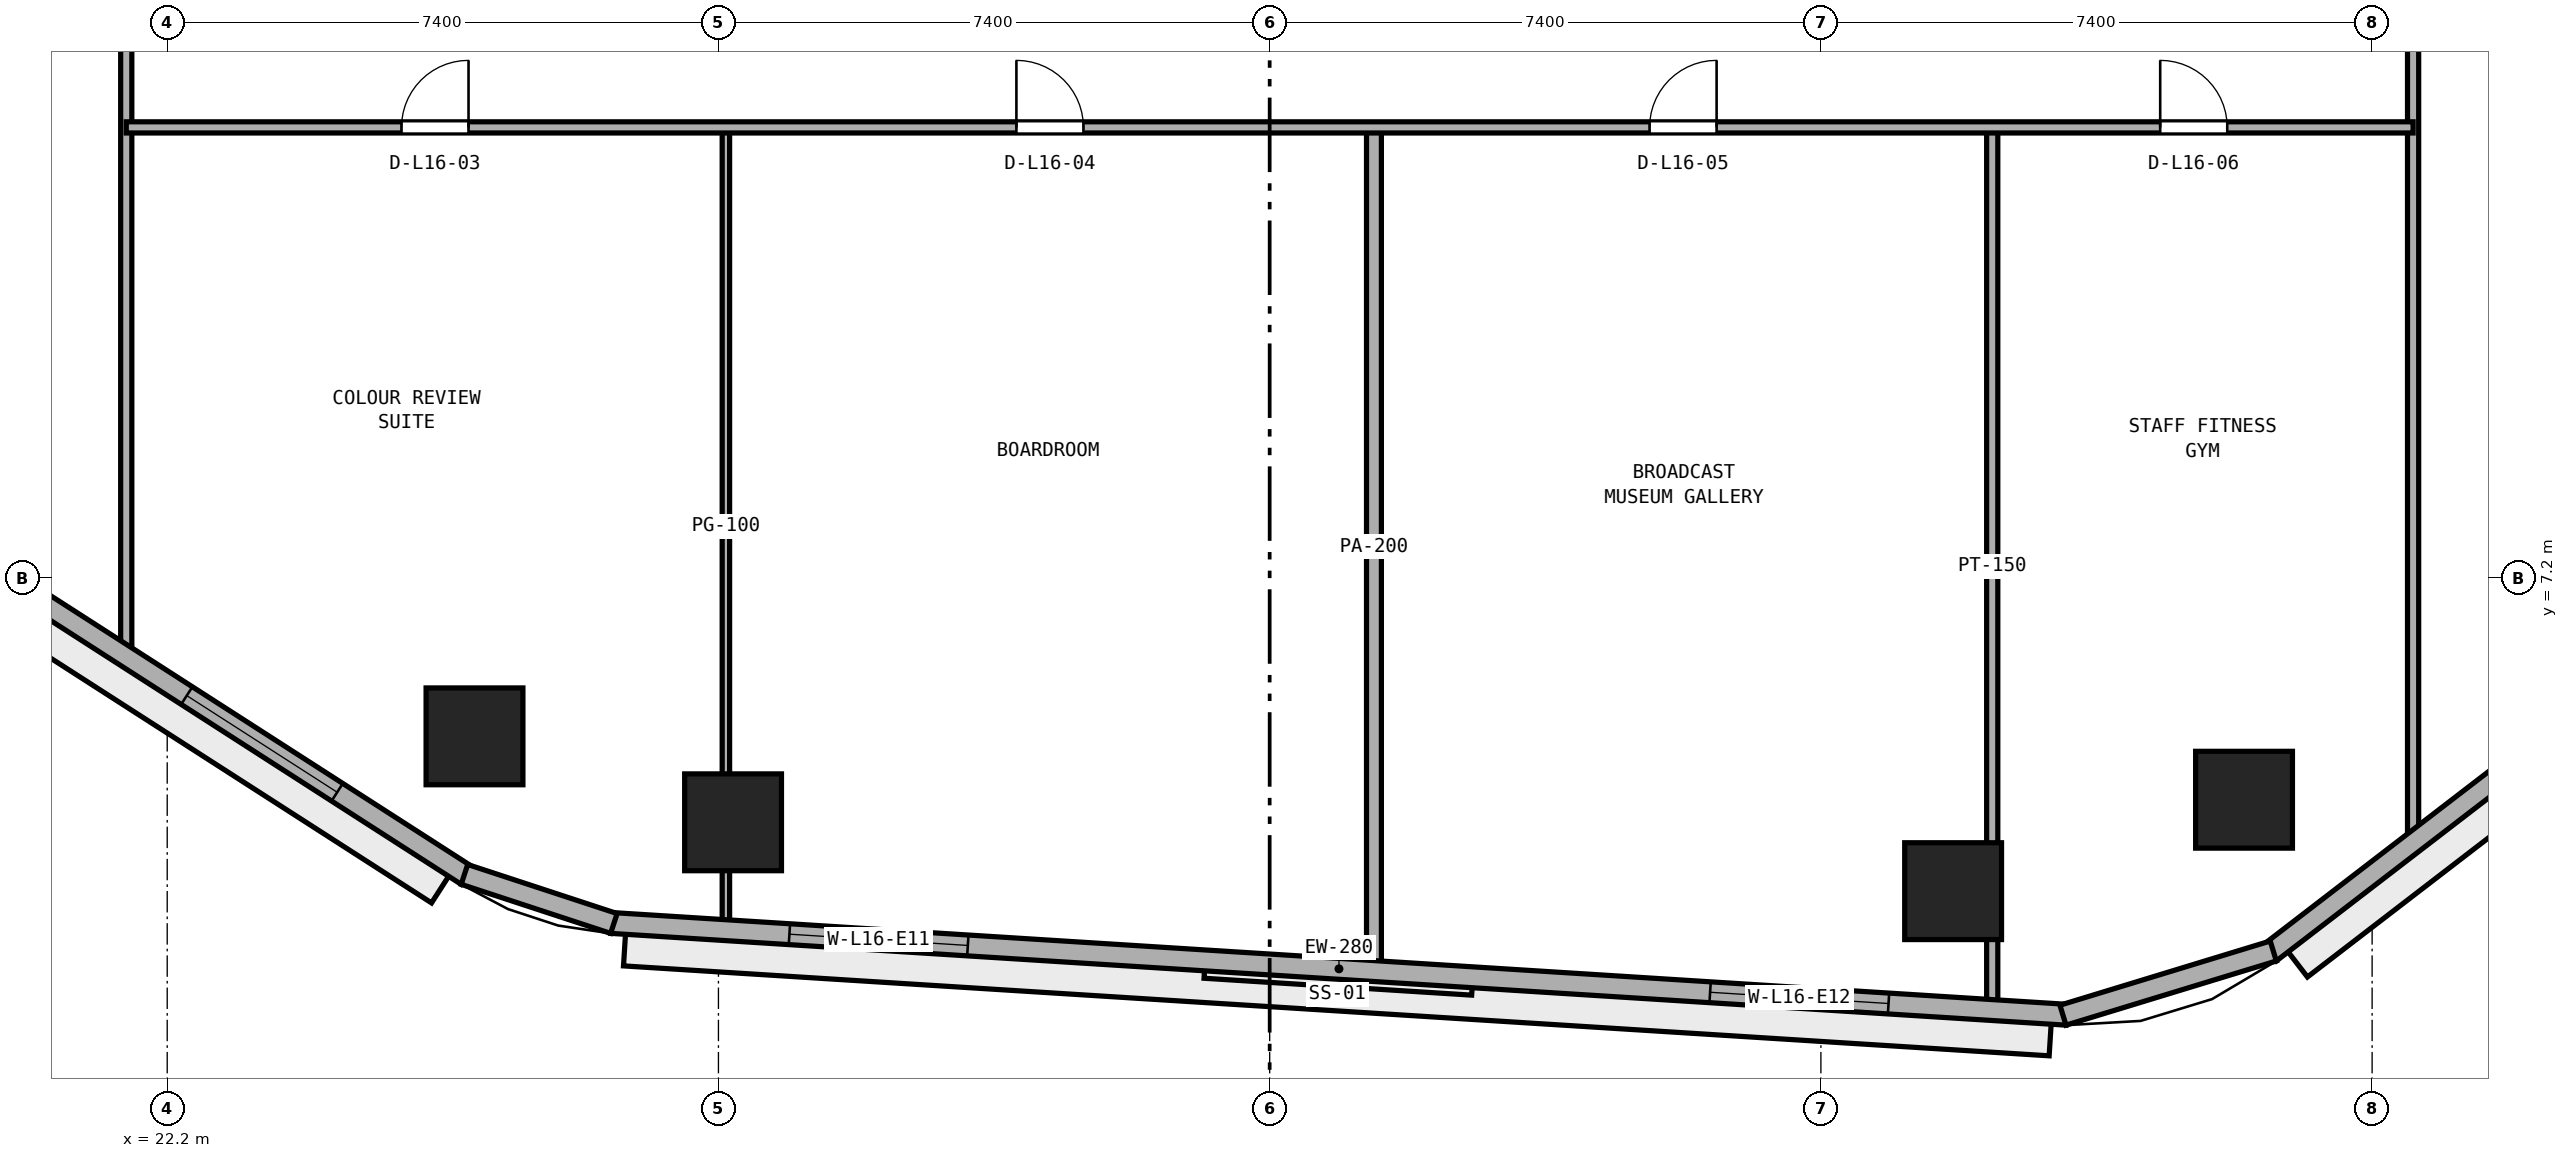
"""IFC4 building model, lengths in metres.
Left out: names, types, materials, properties, quantities, classifications, styles, units other than length and angle.
Written with IfcOpenShell. Run it as: python <this file> out.ifc"""

import sys

from ifc_helpers import new_model, si_unit, direction, frame, frame_2d, origin, origin_2d, place, context, subcontext, project, spatial, rectangle, extrude, element, fill, save


model = new_model("IFC4")
c1 = context("Model", 3, precision=1e-05, world=origin(), true_north=direction((0.0, 1.0)))
c2 = subcontext(c1, "Body", "Model", "MODEL_VIEW")
j1 = project(units=[si_unit("LENGTHUNIT", "METRE"), si_unit("PLANEANGLEUNIT", "RADIAN")], contexts=[c1])
p1 = place(None, origin())
s1 = spatial("IfcSite", under=j1, at=p1, CompositionType="ELEMENT")
p2 = place(p1, origin())
s2 = spatial("IfcBuilding", under=s1, at=p2, CompositionType="ELEMENT")
p3 = place(p2, frame((0.0, 0.0, 66.8)))
s3 = spatial("IfcBuildingStorey", under=s2, at=p3, CompositionType="ELEMENT", Elevation=66.8)
for number, where, z_axis, x_axis in (
    (1, (29.796, 3.922, 0.0), (0.0, 0.0, 1.0), (1.0, 0.0, 0.0)),
    (2, (46.175, 2.998, 0.0), (0.0, 0.0, 1.0), (1.0, 0.0, 0.0)),
    (3, (50.081, 4.225, 0.0), (0.0, 0.0, 1.0), (1.0, 0.0, 0.0)),
    (4, (26.325, 5.076, 0.0), (0.0, 0.0, 1.0), (1.0, 0.0, 0.0)),
):
    element("IfcColumn", number, at=place(p3, frame(where, z_axis=z_axis, x_axis=x_axis)), inside=s3, PredefinedType="COLUMN", context=c2, shape_type="SweptSolid", body=[
        extrude(rectangle(XDim=1.3, YDim=1.3, at=origin_2d()), origin(), (0.0, 0.0, 1.0), 3.8),
    ])
p4 = place(p3, frame((52.35, 3.611, 0.0), z_axis=(0.0, 0.0, 1.0), x_axis=(0.0, 1.0, 0.0)))
e5 = element("IfcWall", 5, at=p4, inside=s3, PredefinedType="PARTITIONING", context=c2, shape_type="SweptSolid", body=[
    extrude(rectangle(XDim=43.441, YDim=0.15, at=frame_2d((21.72, 0.0))), origin(), (0.0, 0.0, 1.0), 3.525),
])
p5 = place(p4, frame((12.364, 0.0, 0.0)))
e6 = element("IfcOpeningElement", 6, at=p5, cuts=e5, PredefinedType="OPENING", context=c2, shape_type="SweptSolid", body=[
    extrude(rectangle(XDim=0.9, YDim=2.1, at=frame_2d((0.45, 1.05))), frame((0.0, 0.085, 0.0), z_axis=(0.0, -1.0, 0.0), x_axis=(1.0, 0.0, 0.0)), (0.0, 0.0, 1.0), 0.17),
])
p6 = place(p4, frame((18.889, 0.0, 0.0)))
e7 = element("IfcOpeningElement", 7, at=p6, cuts=e5, PredefinedType="OPENING", context=c2, shape_type="SweptSolid", body=[
    extrude(rectangle(XDim=1.0, YDim=2.12, at=frame_2d((0.5, 1.06))), frame((0.0, 0.085, 0.0), z_axis=(0.0, -1.0, 0.0), x_axis=(1.0, 0.0, 0.0)), (0.0, 0.0, 1.0), 0.17),
])
p7 = place(p4, frame((25.689, 0.0, 0.0)))
e8 = element("IfcOpeningElement", 8, at=p7, cuts=e5, PredefinedType="OPENING", context=c2, shape_type="SweptSolid", body=[
    extrude(rectangle(XDim=1.0, YDim=2.12, at=frame_2d((0.5, 1.06))), frame((0.0, 0.085, 0.0), z_axis=(0.0, -1.0, 0.0), x_axis=(1.0, 0.0, 0.0)), (0.0, 0.0, 1.0), 0.17),
])
p8 = place(p4, frame((31.114, 0.0, 0.0)))
e9 = element("IfcOpeningElement", 9, at=p8, cuts=e5, PredefinedType="OPENING", context=c2, shape_type="SweptSolid", body=[
    extrude(rectangle(XDim=0.9, YDim=2.1, at=frame_2d((0.45, 1.05))), frame((0.0, 0.085, 0.0), z_axis=(0.0, -1.0, 0.0), x_axis=(1.0, 0.0, 0.0)), (0.0, 0.0, 1.0), 0.17),
])
p9 = place(p3, frame((46.7, 1.467, 0.0), z_axis=(0.0, 0.0, 1.0), x_axis=(0.0, 1.0, 0.0)))
e10 = element("IfcWall", 10, at=p9, inside=s3, PredefinedType="PARTITIONING", context=c2, shape_type="SweptSolid", body=[
    extrude(rectangle(XDim=11.783, YDim=0.15, at=frame_2d((5.892, 0.0))), origin(), (0.0, 0.0, 1.0), 3.525),
])
p10 = place(p3, frame((38.4, 1.99, 0.0), z_axis=(0.0, 0.0, 1.0), x_axis=(0.0, 1.0, 0.0)))
e11 = element("IfcWall", 11, at=p10, inside=s3, PredefinedType="PARTITIONING", context=c2, shape_type="SweptSolid", body=[
    extrude(rectangle(XDim=11.26, YDim=0.2, at=frame_2d((5.63, 0.0))), origin(), (0.0, 0.0, 1.0), 3.525),
])
p11 = place(p3, frame((29.7, 2.539, 0.0), z_axis=(0.0, 0.0, 1.0), x_axis=(0.0, 1.0, 0.0)))
e12 = element("IfcWall", 12, at=p11, inside=s3, PredefinedType="PARTITIONING", context=c2, shape_type="SweptSolid", body=[
    extrude(rectangle(XDim=10.711, YDim=0.1, at=frame_2d((5.355, 0.0))), origin(), (0.0, 0.0, 1.0), 2.908),
])
p12 = place(p3, frame((21.65, 6.119, 0.0), z_axis=(0.0, 0.0, 1.0), x_axis=(0.0, 1.0, 0.0)))
e13 = element("IfcWall", 13, at=p12, inside=s3, PredefinedType="PARTITIONING", context=c2, shape_type="SweptSolid", body=[
    extrude(rectangle(XDim=37.884, YDim=0.15, at=frame_2d((18.942, 0.0))), origin(), (0.0, 0.0, 1.0), 3.525),
])
p13 = place(p12, frame((13.556, 0.0, 0.0)))
e14 = element("IfcOpeningElement", 14, at=p13, cuts=e13, PredefinedType="OPENING", context=c2, shape_type="SweptSolid", body=[
    extrude(rectangle(XDim=0.9, YDim=2.1, at=frame_2d((0.45, 1.05))), frame((0.0, 0.085, 0.0), z_axis=(0.0, -1.0, 0.0), x_axis=(1.0, 0.0, 0.0)), (0.0, 0.0, 1.0), 0.17),
])
p14 = place(p12, frame((25.506, 0.0, 0.0)))
e15 = element("IfcOpeningElement", 15, at=p14, cuts=e13, PredefinedType="OPENING", context=c2, shape_type="SweptSolid", body=[
    extrude(rectangle(XDim=0.9, YDim=2.1, at=frame_2d((0.45, 1.05))), frame((0.0, 0.085, 0.0), z_axis=(0.0, -1.0, 0.0), x_axis=(1.0, 0.0, 0.0)), (0.0, 0.0, 1.0), 0.17),
])
p15 = place(p3, frame((21.65, 13.25, 0.0), z_axis=(0.0, 0.0, 1.0), x_axis=(1.0, 0.0, 0.0)))
e16 = element("IfcWall", 16, at=p15, inside=s3, PredefinedType="PARTITIONING", context=c2, shape_type="SweptSolid", body=[
    extrude(rectangle(XDim=30.7, YDim=0.15, at=frame_2d((15.35, 0.0))), origin(), (0.0, 0.0, 1.0), 3.525),
])
p16 = place(p15, frame((3.695, 0.0, 0.0)))
e17 = element("IfcOpeningElement", 17, at=p16, cuts=e16, PredefinedType="OPENING", context=c2, shape_type="SweptSolid", body=[
    extrude(rectangle(XDim=0.9, YDim=2.1, at=frame_2d((0.45, 1.05))), frame((0.0, 0.085, 0.0), z_axis=(0.0, -1.0, 0.0), x_axis=(1.0, 0.0, 0.0)), (0.0, 0.0, 1.0), 0.17),
])
p17 = place(p15, frame((11.95, 0.0, 0.0)))
e18 = element("IfcOpeningElement", 18, at=p17, cuts=e16, PredefinedType="OPENING", context=c2, shape_type="SweptSolid", body=[
    extrude(rectangle(XDim=0.9, YDim=2.1, at=frame_2d((0.45, 1.05))), frame((0.0, 0.085, 0.0), z_axis=(0.0, -1.0, 0.0), x_axis=(1.0, 0.0, 0.0)), (0.0, 0.0, 1.0), 0.17),
])
p18 = place(p15, frame((20.45, 0.0, 0.0)))
e19 = element("IfcOpeningElement", 19, at=p18, cuts=e16, PredefinedType="OPENING", context=c2, shape_type="SweptSolid", body=[
    extrude(rectangle(XDim=0.9, YDim=2.1, at=frame_2d((0.45, 1.05))), frame((0.0, 0.085, 0.0), z_axis=(0.0, -1.0, 0.0), x_axis=(1.0, 0.0, 0.0)), (0.0, 0.0, 1.0), 0.17),
])
p19 = place(p15, frame((27.305, 0.0, 0.0)))
e20 = element("IfcOpeningElement", 20, at=p19, cuts=e16, PredefinedType="OPENING", context=c2, shape_type="SweptSolid", body=[
    extrude(rectangle(XDim=0.9, YDim=2.1, at=frame_2d((0.45, 1.05))), frame((0.0, 0.085, 0.0), z_axis=(0.0, -1.0, 0.0), x_axis=(1.0, 0.0, 0.0)), (0.0, 0.0, 1.0), 0.17),
])
p20 = place(p3, frame((28.161, 2.571, 0.0), z_axis=(0.0, 0.0, 1.0), x_axis=(0.998017288298, -0.06294038654, 0.0)))
e21 = element("IfcWall", 21, at=p20, inside=s3, PredefinedType="STANDARD", context=c2, shape_type="SweptSolid", body=[
    extrude(rectangle(XDim=19.577, YDim=0.28, at=frame_2d((9.789, 0.0))), origin(), (0.0, 0.0, 1.0), 3.525),
])
p21 = place(p20, frame((2.396, 0.0, 0.9)))
e22 = element("IfcOpeningElement", 22, at=p21, cuts=e21, PredefinedType="OPENING", context=c2, shape_type="SweptSolid", body=[
    extrude(rectangle(XDim=2.4, YDim=1.75, at=frame_2d((1.2, 0.875))), frame((0.0, 0.15, 0.0), z_axis=(0.0, -1.0, 0.0), x_axis=(1.0, 0.0, 0.0)), (0.0, 0.0, 1.0), 0.3),
])
p22 = place(p20, frame((14.781, 0.0, 0.9)))
e23 = element("IfcOpeningElement", 23, at=p22, cuts=e21, PredefinedType="OPENING", context=c2, shape_type="SweptSolid", body=[
    extrude(rectangle(XDim=2.4, YDim=1.75, at=frame_2d((1.2, 0.875))), frame((0.0, 0.15, 0.0), z_axis=(0.0, -1.0, 0.0), x_axis=(1.0, 0.0, 0.0)), (0.0, 0.0, 1.0), 0.3),
])
p23 = place(p3, frame((50.429, 2.172, 0.0), z_axis=(0.0, 0.0, 1.0), x_axis=(0.792937466367, 0.609303023488, 0.0)))
e24 = element("IfcWall", 24, at=p23, inside=s3, PredefinedType="STANDARD", context=c2, shape_type="SweptSolid", body=[
    extrude(rectangle(XDim=17.713, YDim=0.28, at=frame_2d((8.856, 0.0))), origin(), (0.0, 0.0, 1.0), 3.525),
])
p24 = place(p23, frame((7.656, 0.0, 0.9)))
e25 = element("IfcOpeningElement", 25, at=p24, cuts=e24, PredefinedType="OPENING", context=c2, shape_type="SweptSolid", body=[
    extrude(rectangle(XDim=2.4, YDim=1.75, at=frame_2d((1.2, 0.875))), frame((0.0, 0.15, 0.0), z_axis=(0.0, -1.0, 0.0), x_axis=(1.0, 0.0, 0.0)), (0.0, 0.0, 1.0), 0.3),
])
p25 = place(p23, frame((13.227, 0.0, 0.9)))
e26 = element("IfcOpeningElement", 26, at=p25, cuts=e24, PredefinedType="OPENING", context=c2, shape_type="SweptSolid", body=[
    extrude(rectangle(XDim=2.4, YDim=1.75, at=frame_2d((1.2, 0.875))), frame((0.0, 0.15, 0.0), z_axis=(0.0, -1.0, 0.0), x_axis=(1.0, 0.0, 0.0)), (0.0, 0.0, 1.0), 0.3),
])
p26 = place(p3, frame((11.405, 12.728, 0.0), z_axis=(0.0, 0.0, 1.0), x_axis=(0.841304564637, -0.540561402175, 0.0)))
e27 = element("IfcWall", 27, at=p26, inside=s3, PredefinedType="STANDARD", context=c2, shape_type="SweptSolid", body=[
    extrude(rectangle(XDim=17.612, YDim=0.28, at=frame_2d((8.806, 0.0))), origin(), (0.0, 0.0, 1.0), 3.525),
])
p27 = place(p26, frame((2.069, 0.0, 0.9)))
e28 = element("IfcOpeningElement", 28, at=p27, cuts=e27, PredefinedType="OPENING", context=c2, shape_type="SweptSolid", body=[
    extrude(rectangle(XDim=2.4, YDim=1.75, at=frame_2d((1.2, 0.875))), frame((0.0, 0.15, 0.0), z_axis=(0.0, -1.0, 0.0), x_axis=(1.0, 0.0, 0.0)), (0.0, 0.0, 1.0), 0.3),
])
p28 = place(p26, frame((7.606, 0.0, 0.9)))
e29 = element("IfcOpeningElement", 29, at=p28, cuts=e27, PredefinedType="OPENING", context=c2, shape_type="SweptSolid", body=[
    extrude(rectangle(XDim=2.4, YDim=1.75, at=frame_2d((1.2, 0.875))), frame((0.0, 0.15, 0.0), z_axis=(0.0, -1.0, 0.0), x_axis=(1.0, 0.0, 0.0)), (0.0, 0.0, 1.0), 0.3),
])
p29 = place(p26, frame((13.143, 0.0, 0.9)))
e30 = element("IfcOpeningElement", 30, at=p29, cuts=e27, PredefinedType="OPENING", context=c2, shape_type="SweptSolid", body=[
    extrude(rectangle(XDim=2.4, YDim=1.75, at=frame_2d((1.2, 0.875))), frame((0.0, 0.15, 0.0), z_axis=(0.0, -1.0, 0.0), x_axis=(1.0, 0.0, 0.0)), (0.0, 0.0, 1.0), 0.3),
])
p30 = place(p3, frame((47.65, 1.333, 0.0), z_axis=(0.0, 0.0, 1.0), x_axis=(0.956461287977, 0.291859220516, 0.0)))
e31 = element("IfcWall", 31, at=p30, inside=s3, PredefinedType="STANDARD", context=c2, shape_type="SweptSolid", body=[
    extrude(rectangle(XDim=2.952, YDim=0.28, at=frame_2d((1.476, 0.0))), origin(), (0.0, 0.0, 1.0), 3.525),
])
p31 = place(p3, frame((26.19, 3.223, 0.0), z_axis=(0.0, 0.0, 1.0), x_axis=(0.95016442175, -0.311749212734, 0.0)))
e32 = element("IfcWall", 32, at=p31, inside=s3, PredefinedType="STANDARD", context=c2, shape_type="SweptSolid", body=[
    extrude(rectangle(XDim=2.111, YDim=0.28, at=frame_2d((1.056, 0.0))), origin(), (0.0, 0.0, 1.0), 3.525),
])
p32 = place(p16, origin())
e33 = element("IfcDoor", 33, at=p32, inside=s3, OperationType="SINGLE_SWING_RIGHT", PredefinedType="DOOR", context=c2, shape_type="SweptSolid", body=[
    extrude(rectangle(XDim=0.9, YDim=2.1, at=frame_2d((0.45, 1.05))), frame((0.0, 0.025, 0.0), z_axis=(0.0, -1.0, 0.0), x_axis=(1.0, 0.0, 0.0)), (0.0, 0.0, 1.0), 0.05),
])
fill(e17, e33)
p33 = place(p17, origin())
e34 = element("IfcDoor", 34, at=p33, inside=s3, OperationType="SINGLE_SWING_LEFT", PredefinedType="DOOR", context=c2, shape_type="SweptSolid", body=[
    extrude(rectangle(XDim=0.9, YDim=2.1, at=frame_2d((0.45, 1.05))), frame((0.0, 0.025, 0.0), z_axis=(0.0, -1.0, 0.0), x_axis=(1.0, 0.0, 0.0)), (0.0, 0.0, 1.0), 0.05),
])
fill(e18, e34)
p34 = place(p18, origin())
e35 = element("IfcDoor", 35, at=p34, inside=s3, OperationType="SINGLE_SWING_RIGHT", PredefinedType="DOOR", context=c2, shape_type="SweptSolid", body=[
    extrude(rectangle(XDim=0.9, YDim=2.1, at=frame_2d((0.45, 1.05))), frame((0.0, 0.025, 0.0), z_axis=(0.0, -1.0, 0.0), x_axis=(1.0, 0.0, 0.0)), (0.0, 0.0, 1.0), 0.05),
])
fill(e19, e35)
p35 = place(p19, origin())
e36 = element("IfcDoor", 36, at=p35, inside=s3, OperationType="SINGLE_SWING_LEFT", PredefinedType="DOOR", context=c2, shape_type="SweptSolid", body=[
    extrude(rectangle(XDim=0.9, YDim=2.1, at=frame_2d((0.45, 1.05))), frame((0.0, 0.025, 0.0), z_axis=(0.0, -1.0, 0.0), x_axis=(1.0, 0.0, 0.0)), (0.0, 0.0, 1.0), 0.05),
])
fill(e20, e36)
p36 = place(p21, origin())
e37 = element("IfcWindow", 37, at=p36, inside=s3, PartitioningType="SINGLE_PANEL", PredefinedType="WINDOW", context=c2, shape_type="SweptSolid", body=[
    extrude(rectangle(XDim=2.4, YDim=1.75, at=frame_2d((1.2, 0.875))), frame((0.0, 0.03, 0.0), z_axis=(0.0, -1.0, 0.0), x_axis=(1.0, 0.0, 0.0)), (0.0, 0.0, 1.0), 0.06),
])
fill(e22, e37)
p37 = place(p22, origin())
e38 = element("IfcWindow", 38, at=p37, inside=s3, PartitioningType="SINGLE_PANEL", PredefinedType="WINDOW", context=c2, shape_type="SweptSolid", body=[
    extrude(rectangle(XDim=2.4, YDim=1.75, at=frame_2d((1.2, 0.875))), frame((0.0, 0.03, 0.0), z_axis=(0.0, -1.0, 0.0), x_axis=(1.0, 0.0, 0.0)), (0.0, 0.0, 1.0), 0.06),
])
fill(e23, e38)
p38 = place(p29, origin())
e39 = element("IfcWindow", 39, at=p38, inside=s3, PartitioningType="SINGLE_PANEL", PredefinedType="WINDOW", context=c2, shape_type="SweptSolid", body=[
    extrude(rectangle(XDim=2.4, YDim=1.75, at=frame_2d((1.2, 0.875))), frame((0.0, 0.03, 0.0), z_axis=(0.0, -1.0, 0.0), x_axis=(1.0, 0.0, 0.0)), (0.0, 0.0, 1.0), 0.06),
])
fill(e30, e39)
save(model, sys.argv[1])
